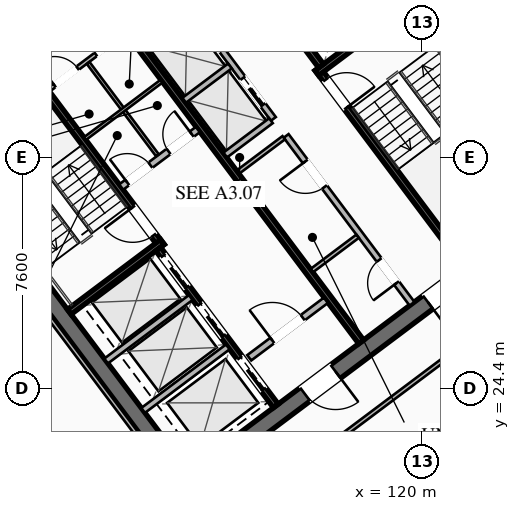
"""IFC4 building model, lengths in metres.
Left out: names, types, materials, properties, quantities, classifications, styles, units other than length and angle.
Written with IfcOpenShell. Run it as: python <this file> out.ifc"""

import sys

from ifc_helpers import new_model, si_unit, direction, frame, frame_2d, origin, place, context, subcontext, project, spatial, rectangle, extrude, element, fill, save


model = new_model("IFC4")
c1 = context("Model", 3, precision=1e-05, world=origin(), true_north=direction((0.0, 1.0)))
c2 = subcontext(c1, "Body", "Model", "MODEL_VIEW")
j1 = project(units=[si_unit("LENGTHUNIT", "METRE"), si_unit("PLANEANGLEUNIT", "RADIAN")], contexts=[c1])
p1 = place(None, origin())
s1 = spatial("IfcSite", under=j1, at=p1, CompositionType="ELEMENT")
p2 = place(p1, origin())
s2 = spatial("IfcBuilding", under=s1, at=p2, CompositionType="ELEMENT")
p3 = place(p2, frame((0.0, 0.0, 146.35)))
s3 = spatial("IfcBuildingStorey", under=s2, at=p3, CompositionType="ELEMENT", Elevation=146.35)
for number, where, z_axis, x_axis in (
    (1, (112.436, 21.077, 0.0), (0.0, 0.0, 1.0), (-0.6, 0.8, 0.0)),
    (2, (115.564, 42.923, 0.0), (0.0, 0.0, 1.0), (0.6, -0.8, 0.0)),
):
    element("IfcWall", number, at=place(p3, frame(where, z_axis=z_axis, x_axis=x_axis)), inside=s3, PredefinedType="SHEAR", context=c2, shape_type="SweptSolid", body=[
        extrude(rectangle(XDim=15.6, YDim=0.55, at=frame_2d((7.8, 0.0))), origin(), (0.0, 0.0, 1.0), 3.55),
    ])
p4 = place(p3, frame((124.539, 30.498, 0.0), z_axis=(0.0, 0.0, 1.0), x_axis=(-0.799998054672, -0.600002593761, 0.0)))
e3 = element("IfcWall", 3, at=p4, inside=s3, PredefinedType="SHEAR", context=c2, shape_type="SweptSolid", body=[
    extrude(rectangle(XDim=15.06, YDim=0.55, at=frame_2d((7.53, 0.0))), origin(), (0.0, 0.0, 1.0), 3.55),
])
p5 = place(p4, frame((9.23, 0.0, 0.0)))
e4 = element("IfcOpeningElement", 4, at=p5, cuts=e3, PredefinedType="OPENING", context=c2, shape_type="SweptSolid", body=[
    extrude(rectangle(XDim=1.25, YDim=2.25, at=frame_2d((0.625, 1.125))), frame((0.0, 0.285, 0.0), z_axis=(0.0, -1.0, 0.0), x_axis=(1.0, 0.0, 0.0)), (0.0, 0.0, 1.0), 0.57),
])
p6 = place(p4, frame((4.18, 0.0, 0.0)))
e5 = element("IfcOpeningElement", 5, at=p6, cuts=e3, PredefinedType="OPENING", context=c2, shape_type="SweptSolid", body=[
    extrude(rectangle(XDim=1.25, YDim=2.25, at=frame_2d((0.625, 1.125))), frame((0.0, 0.285, 0.0), z_axis=(0.0, -1.0, 0.0), x_axis=(1.0, 0.0, 0.0)), (0.0, 0.0, 1.0), 0.57),
])
p7 = place(p3, frame((103.461, 33.502, 0.0), z_axis=(0.0, 0.0, 1.0), x_axis=(0.799998054672, 0.600002593761, 0.0)))
e6 = element("IfcWall", 6, at=p7, inside=s3, PredefinedType="SHEAR", context=c2, shape_type="SweptSolid", body=[
    extrude(rectangle(XDim=15.06, YDim=0.55, at=frame_2d((7.53, 0.0))), origin(), (0.0, 0.0, 1.0), 3.55),
])
p8 = place(p7, frame((4.58, 0.0, 0.0)))
e7 = element("IfcOpeningElement", 7, at=p8, cuts=e6, PredefinedType="OPENING", context=c2, shape_type="SweptSolid", body=[
    extrude(rectangle(XDim=1.25, YDim=2.25, at=frame_2d((0.625, 1.125))), frame((0.0, 0.285, 0.0), z_axis=(0.0, -1.0, 0.0), x_axis=(1.0, 0.0, 0.0)), (0.0, 0.0, 1.0), 0.57),
])
p9 = place(p7, frame((9.63, 0.0, 0.0)))
e8 = element("IfcOpeningElement", 8, at=p9, cuts=e6, PredefinedType="OPENING", context=c2, shape_type="SweptSolid", body=[
    extrude(rectangle(XDim=1.25, YDim=2.25, at=frame_2d((0.625, 1.125))), frame((0.0, 0.285, 0.0), z_axis=(0.0, -1.0, 0.0), x_axis=(1.0, 0.0, 0.0)), (0.0, 0.0, 1.0), 0.57),
])
p10 = place(p3, frame((111.44, 29.08, 0.0), z_axis=(0.0, 0.0, 1.0), x_axis=(-0.59999029481, 0.8000072788, 0.0)))
e9 = element("IfcWall", 9, at=p10, inside=s3, PredefinedType="SHEAR", context=c2, shape_type="SweptSolid", body=[
    extrude(rectangle(XDim=8.05, YDim=0.2, at=frame_2d((4.025, 0.0))), origin(), (0.0, 0.0, 1.0), 3.37),
])
p11 = place(p10, frame((0.45, 0.0, 0.0)))
e10 = element("IfcOpeningElement", 10, at=p11, cuts=e9, PredefinedType="OPENING", context=c2, shape_type="SweptSolid", body=[
    extrude(rectangle(XDim=1.15, YDim=2.2, at=frame_2d((0.575, 1.1))), frame((0.0, 0.11, 0.0), z_axis=(0.0, -1.0, 0.0), x_axis=(1.0, 0.0, 0.0)), (0.0, 0.0, 1.0), 0.22),
])
p12 = place(p3, frame((108.396, 26.922, 0.0), z_axis=(0.0, 0.0, 1.0), x_axis=(0.800015298837, 0.599979601008, 0.0)))
e11 = element("IfcWall", 11, at=p12, inside=s3, PredefinedType="SHEAR", context=c2, shape_type="SweptSolid", body=[
    extrude(rectangle(XDim=3.83, YDim=0.2, at=frame_2d((1.915, 0.0))), origin(), (0.0, 0.0, 1.0), 3.37),
])
p13 = place(p3, frame((116.56, 34.92, 0.0), z_axis=(0.0, 0.0, 1.0), x_axis=(0.59999029481, -0.8000072788, 0.0)))
e12 = element("IfcWall", 12, at=p13, inside=s3, PredefinedType="SHEAR", context=c2, shape_type="SweptSolid", body=[
    extrude(rectangle(XDim=8.05, YDim=0.2, at=frame_2d((4.025, 0.0))), origin(), (0.0, 0.0, 1.0), 3.37),
])
p14 = place(p13, frame((0.45, 0.0, 0.0)))
e13 = element("IfcOpeningElement", 13, at=p14, cuts=e12, PredefinedType="OPENING", context=c2, shape_type="SweptSolid", body=[
    extrude(rectangle(XDim=1.15, YDim=2.2, at=frame_2d((0.575, 1.1))), frame((0.0, 0.11, 0.0), z_axis=(0.0, -1.0, 0.0), x_axis=(1.0, 0.0, 0.0)), (0.0, 0.0, 1.0), 0.22),
])
p15 = place(p3, frame((116.54, 34.78, 0.0), z_axis=(0.0, 0.0, 1.0), x_axis=(0.800015298837, 0.599979601008, 0.0)))
e14 = element("IfcWall", 14, at=p15, inside=s3, PredefinedType="SHEAR", context=c2, shape_type="SweptSolid", body=[
    extrude(rectangle(XDim=3.83, YDim=0.2, at=frame_2d((1.915, 0.0))), origin(), (0.0, 0.0, 1.0), 3.37),
])
p16 = place(p3, frame((117.998, 25.936, 0.0), z_axis=(0.0, 0.0, 1.0), x_axis=(-0.600002693989, 0.799997979501, 0.0)))
e15 = element("IfcWall", 15, at=p16, inside=s3, PredefinedType="SHEAR", context=c2, shape_type="SweptSolid", body=[
    extrude(rectangle(XDim=14.5, YDim=0.2, at=frame_2d((7.25, 0.0))), origin(), (0.0, 0.0, 1.0), 3.37),
])
p17 = place(p3, frame((110.104, 31.028, 0.0), z_axis=(0.0, 0.0, 1.0), x_axis=(0.800018601094, 0.59997519774, 0.0)))
e16 = element("IfcWall", 16, at=p17, inside=s3, PredefinedType="SOLIDWALL", context=c2, shape_type="SweptSolid", body=[
    extrude(rectangle(XDim=3.15, YDim=0.22, at=frame_2d((1.575, 0.0))), origin(), (0.0, 0.0, 1.0), 2.723),
])
p18 = place(p17, frame((0.25, 0.0, 0.0)))
e17 = element("IfcOpeningElement", 17, at=p18, cuts=e16, PredefinedType="OPENING", context=c2, shape_type="SweptSolid", body=[
    extrude(rectangle(XDim=0.95, YDim=2.05, at=frame_2d((0.475, 1.025))), frame((0.0, 0.12, 0.0), z_axis=(0.0, -1.0, 0.0), x_axis=(1.0, 0.0, 0.0)), (0.0, 0.0, 1.0), 0.24),
])
p19 = place(p17, frame((1.95, 0.0, 0.0)))
e18 = element("IfcOpeningElement", 18, at=p19, cuts=e16, PredefinedType="OPENING", context=c2, shape_type="SweptSolid", body=[
    extrude(rectangle(XDim=0.95, YDim=2.05, at=frame_2d((0.475, 1.025))), frame((0.0, 0.12, 0.0), z_axis=(0.0, -1.0, 0.0), x_axis=(1.0, 0.0, 0.0)), (0.0, 0.0, 1.0), 0.24),
])
p20 = place(p3, frame((114.316, 25.412, 0.0), z_axis=(0.0, 0.0, 1.0), x_axis=(0.800018601094, 0.59997519774, 0.0)))
e19 = element("IfcWall", 19, at=p20, inside=s3, PredefinedType="SOLIDWALL", context=c2, shape_type="SweptSolid", body=[
    extrude(rectangle(XDim=3.15, YDim=0.22, at=frame_2d((1.575, 0.0))), origin(), (0.0, 0.0, 1.0), 2.723),
])
p21 = place(p20, frame((0.95, 0.0, 0.0)))
e20 = element("IfcOpeningElement", 20, at=p21, cuts=e19, PredefinedType="OPENING", context=c2, shape_type="SweptSolid", body=[
    extrude(rectangle(XDim=1.25, YDim=2.25, at=frame_2d((0.625, 1.125))), frame((0.0, 0.12, 0.0), z_axis=(0.0, -1.0, 0.0), x_axis=(1.0, 0.0, 0.0)), (0.0, 0.0, 1.0), 0.24),
])
p22 = place(p3, frame((115.19, 23.83, 0.0), z_axis=(0.0, 0.0, 1.0), x_axis=(-0.599993943644, 0.800004542231, 0.0)))
e21 = element("IfcWall", 21, at=p22, inside=s3, PredefinedType="SHEAR", context=c2, shape_type="SweptSolid", body=[
    extrude(rectangle(XDim=6.45, YDim=0.2, at=frame_2d((3.225, 0.0))), origin(), (0.0, 0.0, 1.0), 3.37),
])
p23 = place(p22, frame((4.875, 0.0, 0.0)))
e22 = element("IfcOpeningElement", 22, at=p23, cuts=e21, PredefinedType="OPENING", context=c2, shape_type="SweptSolid", body=[
    extrude(rectangle(XDim=1.3, YDim=2.25, at=frame_2d((0.65, 1.125))), frame((0.0, 0.11, 0.0), z_axis=(0.0, -1.0, 0.0), x_axis=(1.0, 0.0, 0.0)), (0.0, 0.0, 1.0), 0.22),
])
p24 = place(p22, frame((2.875, 0.0, 0.0)))
e23 = element("IfcOpeningElement", 23, at=p24, cuts=e21, PredefinedType="OPENING", context=c2, shape_type="SweptSolid", body=[
    extrude(rectangle(XDim=1.3, YDim=2.25, at=frame_2d((0.65, 1.125))), frame((0.0, 0.11, 0.0), z_axis=(0.0, -1.0, 0.0), x_axis=(1.0, 0.0, 0.0)), (0.0, 0.0, 1.0), 0.22),
])
p25 = place(p22, frame((0.675, 0.0, 0.0)))
e24 = element("IfcOpeningElement", 24, at=p25, cuts=e21, PredefinedType="OPENING", context=c2, shape_type="SweptSolid", body=[
    extrude(rectangle(XDim=1.3, YDim=2.25, at=frame_2d((0.65, 1.125))), frame((0.0, 0.11, 0.0), z_axis=(0.0, -1.0, 0.0), x_axis=(1.0, 0.0, 0.0)), (0.0, 0.0, 1.0), 0.22),
])
for number, where, z_axis, x_axis in (
    (25, (110.826, 23.682, 0.0), (0.0, 0.0, 1.0), (0.8, 0.6, 0.0)),
    (26, (109.608, 25.306, 0.0), (0.0, 0.0, 1.0), (0.8, 0.6, 0.0)),
):
    element("IfcWall", number, at=place(p3, frame(where, z_axis=z_axis, x_axis=x_axis)), inside=s3, PredefinedType="SOLIDWALL", context=c2, shape_type="SweptSolid", body=[
        extrude(rectangle(XDim=3.48, YDim=0.2, at=frame_2d((1.74, 0.0))), origin(), (0.0, 0.0, 1.0), 3.37),
    ])
p26 = place(p3, frame((112.81, 40.17, 0.0), z_axis=(0.0, 0.0, 1.0), x_axis=(0.599993943644, -0.800004542231, 0.0)))
e27 = element("IfcWall", 27, at=p26, inside=s3, PredefinedType="SHEAR", context=c2, shape_type="SweptSolid", body=[
    extrude(rectangle(XDim=6.45, YDim=0.2, at=frame_2d((3.225, 0.0))), origin(), (0.0, 0.0, 1.0), 3.37),
])
p27 = place(p3, frame((107.71, 34.22, 0.0), z_axis=(0.0, 0.0, 1.0), x_axis=(0.799981399002, 0.60002480053, 0.0)))
e28 = element("IfcWall", 28, at=p27, inside=s3, PredefinedType="PARTITIONING", context=c2, shape_type="SweptSolid", body=[
    extrude(rectangle(XDim=3.15, YDim=0.135, at=frame_2d((1.575, 0.0))), origin(), (0.0, 0.0, 1.0), 2.723),
])
p28 = place(p27, frame((0.25, 0.0, 0.0)))
e29 = element("IfcOpeningElement", 29, at=p28, cuts=e28, PredefinedType="OPENING", context=c2, shape_type="SweptSolid", body=[
    extrude(rectangle(XDim=0.95, YDim=2.05, at=frame_2d((0.475, 1.025))), frame((0.0, 0.077, 0.0), z_axis=(0.0, -1.0, 0.0), x_axis=(1.0, 0.0, 0.0)), (0.0, 0.0, 1.0), 0.155),
])
p29 = place(p27, frame((1.95, 0.0, 0.0)))
e30 = element("IfcOpeningElement", 30, at=p29, cuts=e28, PredefinedType="OPENING", context=c2, shape_type="SweptSolid", body=[
    extrude(rectangle(XDim=0.95, YDim=2.05, at=frame_2d((0.475, 1.025))), frame((0.0, 0.077, 0.0), z_axis=(0.0, -1.0, 0.0), x_axis=(1.0, 0.0, 0.0)), (0.0, 0.0, 1.0), 0.155),
])
p30 = place(p3, frame((111.296, 32.072, 0.0), z_axis=(0.0, 0.0, 1.0), x_axis=(-0.59995887973, 0.800030838552, 0.0)))
e31 = element("IfcWall", 31, at=p30, inside=s3, PredefinedType="PARTITIONING", context=c2, shape_type="SweptSolid", body=[
    extrude(rectangle(XDim=3.8, YDim=0.11, at=frame_2d((1.9, 0.0))), origin(), (0.0, 0.0, 1.0), 2.723),
])
p31 = place(p3, frame((108.91, 32.62, 0.0), z_axis=(0.0, 0.0, 1.0), x_axis=(0.800018601094, 0.59997519774, 0.0)))
e32 = element("IfcWall", 32, at=p31, inside=s3, PredefinedType="PARTITIONING", context=c2, shape_type="SweptSolid", body=[
    extrude(rectangle(XDim=3.15, YDim=0.11, at=frame_2d((1.575, 0.0))), origin(), (0.0, 0.0, 1.0), 2.723),
])
p32 = place(p3, frame((119.67, 27.19, 0.0), z_axis=(0.0, 0.0, 1.0), x_axis=(-0.599988677396, 0.800008491828, 0.0)))
e33 = element("IfcWall", 33, at=p32, inside=s3, PredefinedType="SOLIDWALL", context=c2, shape_type="SweptSolid", body=[
    extrude(rectangle(XDim=6.9, YDim=0.2, at=frame_2d((3.45, 0.0))), origin(), (0.0, 0.0, 1.0), 2.723),
])
p33 = place(p32, frame((0.85, 0.0, 0.0)))
e34 = element("IfcOpeningElement", 34, at=p33, cuts=e33, PredefinedType="OPENING", context=c2, shape_type="SweptSolid", body=[
    extrude(rectangle(XDim=0.95, YDim=2.05, at=frame_2d((0.475, 1.025))), frame((0.0, 0.11, 0.0), z_axis=(0.0, -1.0, 0.0), x_axis=(1.0, 0.0, 0.0)), (0.0, 0.0, 1.0), 0.22),
])
p34 = place(p32, frame((4.8, 0.0, 0.0)))
e35 = element("IfcOpeningElement", 35, at=p34, cuts=e33, PredefinedType="OPENING", context=c2, shape_type="SweptSolid", body=[
    extrude(rectangle(XDim=1.05, YDim=2.2, at=frame_2d((0.525, 1.1))), frame((0.0, 0.11, 0.0), z_axis=(0.0, -1.0, 0.0), x_axis=(1.0, 0.0, 0.0)), (0.0, 0.0, 1.0), 0.22),
])
for number, where, z_axis, x_axis in (
    (36, (113.946, 31.522, 0.0), (0.0, 0.0, 1.0), (0.8, 0.6, 0.0)),
    (37, (116.376, 28.282, 0.0), (0.0, 0.0, 1.0), (0.8, 0.6, 0.0)),
):
    element("IfcWall", number, at=place(p3, frame(where, z_axis=z_axis, x_axis=x_axis)), inside=s3, PredefinedType="PARTITIONING", context=c2, shape_type="SweptSolid", body=[
        extrude(rectangle(XDim=1.88, YDim=0.135, at=frame_2d((0.94, 0.0))), origin(), (0.0, 0.0, 1.0), 2.723),
    ])
p35 = place(p3, frame((115.11, 33.27, 0.0), z_axis=(0.0, 0.0, 1.0), x_axis=(-0.600011322243, 0.799991508192, 0.0)))
e38 = element("IfcWall", 38, at=p35, inside=s3, PredefinedType="SOLIDWALL", context=c2, shape_type="SweptSolid", body=[
    extrude(rectangle(XDim=6.9, YDim=0.2, at=frame_2d((3.45, 0.0))), origin(), (0.0, 0.0, 1.0), 3.37),
])
p36 = place(p35, frame((0.575, 0.0, 0.0)))
e39 = element("IfcOpeningElement", 39, at=p36, cuts=e38, PredefinedType="OPENING", context=c2, shape_type="SweptSolid", body=[
    extrude(rectangle(XDim=1.1, YDim=2.2, at=frame_2d((0.55, 1.1))), frame((0.0, 0.11, 0.0), z_axis=(0.0, -1.0, 0.0), x_axis=(1.0, 0.0, 0.0)), (0.0, 0.0, 1.0), 0.22),
])
p37 = place(p35, frame((2.825, 0.0, 0.0)))
e40 = element("IfcOpeningElement", 40, at=p37, cuts=e38, PredefinedType="OPENING", context=c2, shape_type="SweptSolid", body=[
    extrude(rectangle(XDim=1.1, YDim=2.2, at=frame_2d((0.55, 1.1))), frame((0.0, 0.11, 0.0), z_axis=(0.0, -1.0, 0.0), x_axis=(1.0, 0.0, 0.0)), (0.0, 0.0, 1.0), 0.22),
])
p38 = place(p35, frame((5.075, 0.0, 0.0)))
e41 = element("IfcOpeningElement", 41, at=p38, cuts=e38, PredefinedType="OPENING", context=c2, shape_type="SweptSolid", body=[
    extrude(rectangle(XDim=1.1, YDim=2.2, at=frame_2d((0.55, 1.1))), frame((0.0, 0.11, 0.0), z_axis=(0.0, -1.0, 0.0), x_axis=(1.0, 0.0, 0.0)), (0.0, 0.0, 1.0), 0.22),
])
p39 = place(p3, frame((113.526, 32.082, 0.0), z_axis=(0.0, 0.0, 1.0), x_axis=(0.800046745961, 0.599937666993, 0.0)))
e42 = element("IfcWall", 42, at=p39, inside=s3, PredefinedType="SOLIDWALL", context=c2, shape_type="SweptSolid", body=[
    extrude(rectangle(XDim=1.88, YDim=0.2, at=frame_2d((0.94, 0.0))), origin(), (0.0, 0.0, 1.0), 3.37),
])
p40 = place(p3, frame((112.176, 33.882, 0.0), z_axis=(0.0, 0.0, 1.0), x_axis=(0.8, 0.6, 0.0)))
e43 = element("IfcWall", 43, at=p40, inside=s3, PredefinedType="SOLIDWALL", context=c2, shape_type="SweptSolid", body=[
    extrude(rectangle(XDim=1.88, YDim=0.2, at=frame_2d((0.94, 0.0))), origin(), (0.0, 0.0, 1.0), 3.37),
])
p41 = place(p3, frame((94.778, 31.546, 0.0), z_axis=(0.0, 0.0, 1.0), x_axis=(0.8, 0.6, 0.0)))
e44 = element("IfcWall", 44, at=p41, inside=s3, PredefinedType="PARTITIONING", context=c2, shape_type="SweptSolid", body=[
    extrude(rectangle(XDim=31.3, YDim=0.135, at=frame_2d((15.65, 0.0))), origin(), (0.0, 0.0, 1.0), 2.723),
])
p42 = place(p41, frame((0.3, 0.0, 0.0)))
e45 = element("IfcOpeningElement", 45, at=p42, cuts=e44, PredefinedType="OPENING", context=c2, shape_type="SweptSolid", body=[
    extrude(rectangle(XDim=0.95, YDim=2.05, at=frame_2d((0.475, 1.025))), frame((0.0, 0.077, 0.0), z_axis=(0.0, -1.0, 0.0), x_axis=(1.0, 0.0, 0.0)), (0.0, 0.0, 1.0), 0.155),
])
p43 = place(p41, frame((11.21, 0.0, 0.0)))
e46 = element("IfcOpeningElement", 46, at=p43, cuts=e44, PredefinedType="OPENING", context=c2, shape_type="SweptSolid", body=[
    extrude(rectangle(XDim=0.95, YDim=2.05, at=frame_2d((0.475, 1.025))), frame((0.0, 0.077, 0.0), z_axis=(0.0, -1.0, 0.0), x_axis=(1.0, 0.0, 0.0)), (0.0, 0.0, 1.0), 0.155),
])
p44 = place(p41, frame((15.487, 0.0, 0.0)))
e47 = element("IfcOpeningElement", 47, at=p44, cuts=e44, PredefinedType="OPENING", context=c2, shape_type="SweptSolid", body=[
    extrude(rectangle(XDim=0.95, YDim=2.05, at=frame_2d((0.475, 1.025))), frame((0.0, 0.077, 0.0), z_axis=(0.0, -1.0, 0.0), x_axis=(1.0, 0.0, 0.0)), (0.0, 0.0, 1.0), 0.155),
])
p45 = place(p41, frame((30.05, 0.0, 0.0)))
e48 = element("IfcOpeningElement", 48, at=p45, cuts=e44, PredefinedType="OPENING", context=c2, shape_type="SweptSolid", body=[
    extrude(rectangle(XDim=0.95, YDim=2.05, at=frame_2d((0.475, 1.025))), frame((0.0, 0.077, 0.0), z_axis=(0.0, -1.0, 0.0), x_axis=(1.0, 0.0, 0.0)), (0.0, 0.0, 1.0), 0.155),
])
p46 = place(p3, frame((132.13, 33.91, 0.0), z_axis=(0.0, 0.0, 1.0), x_axis=(-0.799997191971, -0.600003744021, 0.0)))
e49 = element("IfcWall", 49, at=p46, inside=s3, PredefinedType="PARTITIONING", context=c2, shape_type="SweptSolid", body=[
    extrude(rectangle(XDim=31.3, YDim=0.135, at=frame_2d((15.65, 0.0))), origin(), (0.0, 0.0, 1.0), 2.723),
])
p47 = place(p46, frame((29.97, 0.0, 0.0)))
e50 = element("IfcOpeningElement", 50, at=p47, cuts=e49, PredefinedType="OPENING", context=c2, shape_type="SweptSolid", body=[
    extrude(rectangle(XDim=0.95, YDim=2.05, at=frame_2d((0.475, 1.025))), frame((0.0, 0.077, 0.0), z_axis=(0.0, -1.0, 0.0), x_axis=(1.0, 0.0, 0.0)), (0.0, 0.0, 1.0), 0.155),
])
p48 = place(p46, frame((0.38, 0.0, 0.0)))
e51 = element("IfcOpeningElement", 51, at=p48, cuts=e49, PredefinedType="OPENING", context=c2, shape_type="SweptSolid", body=[
    extrude(rectangle(XDim=0.95, YDim=2.05, at=frame_2d((0.475, 1.025))), frame((0.0, 0.077, 0.0), z_axis=(0.0, -1.0, 0.0), x_axis=(1.0, 0.0, 0.0)), (0.0, 0.0, 1.0), 0.155),
])
p49 = place(p3, frame((112.104, 20.928, 0.0), z_axis=(0.0, 0.0, 1.0), x_axis=(-0.599994940075, 0.800003794918, 0.0)))
e52 = element("IfcWall", 52, at=p49, inside=s3, PredefinedType="PARTITIONING", context=c2, shape_type="SweptSolid", body=[
    extrude(rectangle(XDim=15.44, YDim=0.135, at=frame_2d((7.72, 0.0))), origin(), (0.0, 0.0, 1.0), 2.723),
])
p50 = place(p5, origin())
e53 = element("IfcDoor", 53, at=p50, inside=s3, OperationType="SINGLE_SWING_LEFT", PredefinedType="DOOR", context=c2, shape_type="SweptSolid", body=[
    extrude(rectangle(XDim=1.25, YDim=2.25, at=frame_2d((0.625, 1.125))), frame((0.0, 0.025, 0.0), z_axis=(0.0, -1.0, 0.0), x_axis=(1.0, 0.0, 0.0)), (0.0, 0.0, 1.0), 0.05),
])
fill(e4, e53)
p51 = place(p6, origin())
e54 = element("IfcDoor", 54, at=p51, inside=s3, OperationType="SINGLE_SWING_RIGHT", PredefinedType="DOOR", context=c2, shape_type="SweptSolid", body=[
    extrude(rectangle(XDim=1.25, YDim=2.25, at=frame_2d((0.625, 1.125))), frame((0.0, 0.025, 0.0), z_axis=(0.0, -1.0, 0.0), x_axis=(1.0, 0.0, 0.0)), (0.0, 0.0, 1.0), 0.05),
])
fill(e5, e54)
p52 = place(p11, origin())
e55 = element("IfcDoor", 55, at=p52, inside=s3, OperationType="SINGLE_SWING_RIGHT", PredefinedType="DOOR", context=c2, shape_type="SweptSolid", body=[
    extrude(rectangle(XDim=1.15, YDim=2.2, at=frame_2d((0.575, 1.1))), frame((0.0, 0.025, 0.0), z_axis=(0.0, -1.0, 0.0), x_axis=(1.0, 0.0, 0.0)), (0.0, 0.0, 1.0), 0.05),
])
fill(e10, e55)
p53 = place(p14, origin())
e56 = element("IfcDoor", 56, at=p53, inside=s3, OperationType="SINGLE_SWING_RIGHT", PredefinedType="DOOR", context=c2, shape_type="SweptSolid", body=[
    extrude(rectangle(XDim=1.15, YDim=2.2, at=frame_2d((0.575, 1.1))), frame((0.0, 0.025, 0.0), z_axis=(0.0, -1.0, 0.0), x_axis=(1.0, 0.0, 0.0)), (0.0, 0.0, 1.0), 0.05),
])
fill(e13, e56)
p54 = place(p21, origin())
e57 = element("IfcDoor", 57, at=p54, inside=s3, OperationType="SINGLE_SWING_LEFT", PredefinedType="DOOR", context=c2, shape_type="SweptSolid", body=[
    extrude(rectangle(XDim=1.25, YDim=2.25, at=frame_2d((0.625, 1.125))), frame((0.0, 0.025, 0.0), z_axis=(0.0, -1.0, 0.0), x_axis=(1.0, 0.0, 0.0)), (0.0, 0.0, 1.0), 0.05),
])
fill(e20, e57)
p55 = place(p28, origin())
e58 = element("IfcDoor", 58, at=p55, inside=s3, OperationType="SINGLE_SWING_LEFT", PredefinedType="DOOR", context=c2, shape_type="SweptSolid", body=[
    extrude(rectangle(XDim=0.95, YDim=2.05, at=frame_2d((0.475, 1.025))), frame((0.0, 0.025, 0.0), z_axis=(0.0, -1.0, 0.0), x_axis=(1.0, 0.0, 0.0)), (0.0, 0.0, 1.0), 0.05),
])
fill(e29, e58)
p56 = place(p29, origin())
e59 = element("IfcDoor", 59, at=p56, inside=s3, OperationType="SINGLE_SWING_RIGHT", PredefinedType="DOOR", context=c2, shape_type="SweptSolid", body=[
    extrude(rectangle(XDim=0.95, YDim=2.05, at=frame_2d((0.475, 1.025))), frame((0.0, 0.025, 0.0), z_axis=(0.0, -1.0, 0.0), x_axis=(1.0, 0.0, 0.0)), (0.0, 0.0, 1.0), 0.05),
])
fill(e30, e59)
p57 = place(p18, origin())
e60 = element("IfcDoor", 60, at=p57, inside=s3, OperationType="SINGLE_SWING_LEFT", PredefinedType="DOOR", context=c2, shape_type="SweptSolid", body=[
    extrude(rectangle(XDim=0.95, YDim=2.05, at=frame_2d((0.475, 1.025))), frame((0.0, 0.025, 0.0), z_axis=(0.0, -1.0, 0.0), x_axis=(1.0, 0.0, 0.0)), (0.0, 0.0, 1.0), 0.05),
])
fill(e17, e60)
p58 = place(p19, origin())
e61 = element("IfcDoor", 61, at=p58, inside=s3, OperationType="SINGLE_SWING_RIGHT", PredefinedType="DOOR", context=c2, shape_type="SweptSolid", body=[
    extrude(rectangle(XDim=0.95, YDim=2.05, at=frame_2d((0.475, 1.025))), frame((0.0, 0.025, 0.0), z_axis=(0.0, -1.0, 0.0), x_axis=(1.0, 0.0, 0.0)), (0.0, 0.0, 1.0), 0.05),
])
fill(e18, e61)
p59 = place(p33, origin())
e62 = element("IfcDoor", 62, at=p59, inside=s3, OperationType="SINGLE_SWING_LEFT", PredefinedType="DOOR", context=c2, shape_type="SweptSolid", body=[
    extrude(rectangle(XDim=0.95, YDim=2.05, at=frame_2d((0.475, 1.025))), frame((0.0, 0.025, 0.0), z_axis=(0.0, -1.0, 0.0), x_axis=(1.0, 0.0, 0.0)), (0.0, 0.0, 1.0), 0.05),
])
fill(e34, e62)
p60 = place(p34, origin())
e63 = element("IfcDoor", 63, at=p60, inside=s3, OperationType="SINGLE_SWING_RIGHT", PredefinedType="DOOR", context=c2, shape_type="SweptSolid", body=[
    extrude(rectangle(XDim=1.05, YDim=2.2, at=frame_2d((0.525, 1.1))), frame((0.0, 0.025, 0.0), z_axis=(0.0, -1.0, 0.0), x_axis=(1.0, 0.0, 0.0)), (0.0, 0.0, 1.0), 0.05),
])
fill(e35, e63)
p61 = place(p23, origin())
e64 = element("IfcDoor", 64, at=p61, inside=s3, OperationType="SLIDING_TO_LEFT", PredefinedType="DOOR", context=c2, shape_type="SweptSolid", body=[
    extrude(rectangle(XDim=1.3, YDim=2.25, at=frame_2d((0.65, 1.125))), frame((0.0, 0.025, 0.0), z_axis=(0.0, -1.0, 0.0), x_axis=(1.0, 0.0, 0.0)), (0.0, 0.0, 1.0), 0.05),
])
fill(e22, e64)
p62 = place(p24, origin())
e65 = element("IfcDoor", 65, at=p62, inside=s3, OperationType="SLIDING_TO_LEFT", PredefinedType="DOOR", context=c2, shape_type="SweptSolid", body=[
    extrude(rectangle(XDim=1.3, YDim=2.25, at=frame_2d((0.65, 1.125))), frame((0.0, 0.025, 0.0), z_axis=(0.0, -1.0, 0.0), x_axis=(1.0, 0.0, 0.0)), (0.0, 0.0, 1.0), 0.05),
])
fill(e23, e65)
p63 = place(p25, origin())
e66 = element("IfcDoor", 66, at=p63, inside=s3, OperationType="SLIDING_TO_LEFT", PredefinedType="DOOR", context=c2, shape_type="SweptSolid", body=[
    extrude(rectangle(XDim=1.3, YDim=2.25, at=frame_2d((0.65, 1.125))), frame((0.0, 0.025, 0.0), z_axis=(0.0, -1.0, 0.0), x_axis=(1.0, 0.0, 0.0)), (0.0, 0.0, 1.0), 0.05),
])
fill(e24, e66)
p64 = place(p36, origin())
e67 = element("IfcDoor", 67, at=p64, inside=s3, OperationType="SLIDING_TO_LEFT", PredefinedType="DOOR", context=c2, shape_type="SweptSolid", body=[
    extrude(rectangle(XDim=1.1, YDim=2.2, at=frame_2d((0.55, 1.1))), frame((0.0, 0.025, 0.0), z_axis=(0.0, -1.0, 0.0), x_axis=(1.0, 0.0, 0.0)), (0.0, 0.0, 1.0), 0.05),
])
fill(e39, e67)
save(model, sys.argv[1])
